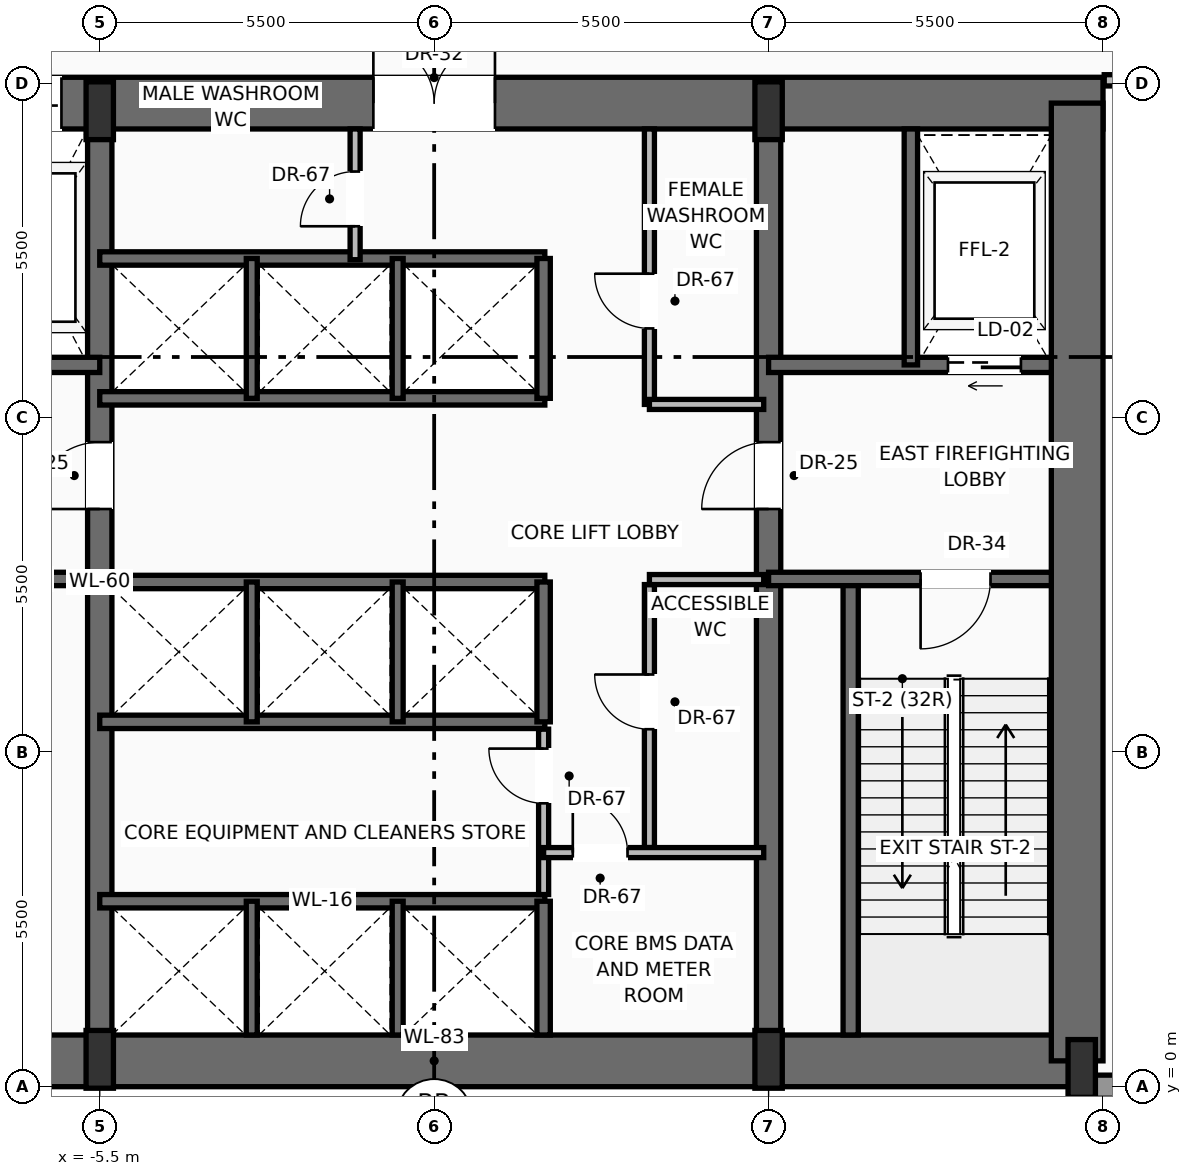
"""IFC4 building model, lengths in metres.
Left out: names, types, materials, properties, quantities, classifications, styles, units other than length and angle.
Written with IfcOpenShell. Run it as: python <this file> out.ifc"""

import sys

from ifc_helpers import new_model, si_unit, direction, frame, frame_2d, origin, origin_2d, place, context, subcontext, project, spatial, rectangle, extrude, source, transform, mapped, element, fill, save


model = new_model("IFC4")
c1 = context("Model", 3, precision=1e-05, world=origin(), true_north=direction((0.0, 1.0)))
c2 = subcontext(c1, "Body", "Model", "MODEL_VIEW")
j1 = project(units=[si_unit("LENGTHUNIT", "METRE"), si_unit("PLANEANGLEUNIT", "RADIAN")], contexts=[c1])
p1 = place(None, origin())
s1 = spatial("IfcSite", under=j1, at=p1, CompositionType="ELEMENT")
p2 = place(p1, origin())
s2 = spatial("IfcBuilding", under=s1, at=p2, CompositionType="ELEMENT")
p3 = place(p2, frame((0.0, 0.0, 5.5)))
s3 = spatial("IfcBuildingStorey", under=s2, at=p3, CompositionType="ELEMENT", Elevation=5.5)
p4 = place(p3, frame((-10.65, 0.425, 0.0), z_axis=(0.0, 0.0, 1.0), x_axis=(1.0, 0.0, 0.0)))
e1 = element("IfcWall", 1, at=p4, inside=s3, PredefinedType="SHEAR", context=c2, shape_type="SweptSolid", body=[
    extrude(rectangle(XDim=21.3, YDim=0.85, at=frame_2d((10.65, 0.0))), origin(), (0.0, 0.0, 1.0), 5.17),
])
p5 = place(p3, frame((-11.0, 16.175, 0.0), z_axis=(0.0, 0.0, 1.0), x_axis=(1.0, 0.0, 0.0)))
e2 = element("IfcWall", 2, at=p5, inside=s3, PredefinedType="SHEAR", context=c2, shape_type="SweptSolid", body=[
    extrude(rectangle(XDim=22.0, YDim=0.85, at=frame_2d((11.0, 0.0))), origin(), (0.0, 0.0, 1.0), 5.17),
])
p6 = place(p5, frame((3.57, 0.0, 0.0)))
e3 = element("IfcOpeningElement", 3, at=p6, cuts=e2, PredefinedType="OPENING", context=c2, shape_type="SweptSolid", body=[
    extrude(rectangle(XDim=1.3, YDim=2.3, at=frame_2d((0.65, 1.15))), frame((0.0, 0.435, 0.0), z_axis=(0.0, -1.0, 0.0), x_axis=(1.0, 0.0, 0.0)), (0.0, 0.0, 1.0), 0.87),
])
p7 = place(p5, frame((10.0, 0.0, 0.0)))
e4 = element("IfcOpeningElement", 4, at=p7, cuts=e2, PredefinedType="OPENING", context=c2, shape_type="SweptSolid", body=[
    extrude(rectangle(XDim=2.0, YDim=2.4, at=frame_2d((1.0, 1.2))), frame((0.0, 0.435, 0.0), z_axis=(0.0, -1.0, 0.0), x_axis=(1.0, 0.0, 0.0)), (0.0, 0.0, 1.0), 0.87),
])
p8 = place(p3, frame((10.575, 0.425, 0.0), z_axis=(0.0, 0.0, 1.0), x_axis=(0.0, 1.0, 0.0)))
e5 = element("IfcWall", 5, at=p8, inside=s3, PredefinedType="SHEAR", context=c2, shape_type="SweptSolid", body=[
    extrude(rectangle(XDim=15.75, YDim=0.85, at=frame_2d((7.875, 0.0))), origin(), (0.0, 0.0, 1.0), 5.17),
])
p9 = place(p3, frame((-5.5, 0.425, 0.0), z_axis=(0.0, 0.0, 1.0), x_axis=(0.0, 1.0, 0.0)))
e6 = element("IfcWall", 6, at=p9, inside=s3, PredefinedType="SHEAR", context=c2, shape_type="SweptSolid", body=[
    extrude(rectangle(XDim=15.75, YDim=0.4, at=frame_2d((7.875, 0.0))), origin(), (0.0, 0.0, 1.0), 5.17),
])
p10 = place(p9, frame((9.075, 0.0, 0.0)))
e7 = element("IfcOpeningElement", 7, at=p10, cuts=e6, PredefinedType="OPENING", context=c2, shape_type="SweptSolid", body=[
    extrude(rectangle(XDim=1.1, YDim=2.2, at=frame_2d((0.55, 1.1))), frame((0.0, 0.21, 0.0), z_axis=(0.0, -1.0, 0.0), x_axis=(1.0, 0.0, 0.0)), (0.0, 0.0, 1.0), 0.42),
])
p11 = place(p3, frame((5.5, 0.425, 0.0), z_axis=(0.0, 0.0, 1.0), x_axis=(0.0, 1.0, 0.0)))
e8 = element("IfcWall", 8, at=p11, inside=s3, PredefinedType="SHEAR", context=c2, shape_type="SweptSolid", body=[
    extrude(rectangle(XDim=15.75, YDim=0.4, at=frame_2d((7.875, 0.0))), origin(), (0.0, 0.0, 1.0), 5.17),
])
p12 = place(p11, frame((9.075, 0.0, 0.0)))
e9 = element("IfcOpeningElement", 9, at=p12, cuts=e8, PredefinedType="OPENING", context=c2, shape_type="SweptSolid", body=[
    extrude(rectangle(XDim=1.1, YDim=2.2, at=frame_2d((0.55, 1.1))), frame((0.0, 0.21, 0.0), z_axis=(0.0, -1.0, 0.0), x_axis=(1.0, 0.0, 0.0)), (0.0, 0.0, 1.0), 0.42),
])
m1 = source(origin(), c2, "Body", "SweptSolid", [
    extrude(rectangle(XDim=0.45, YDim=0.95, at=origin_2d()), origin(), (0.0, 0.0, 1.0), 5.5),
])
for number, where, z_axis, x_axis in (
    (10, (-5.5, 0.45, 0.0), (0.0, 0.0, 1.0), (1.0, 0.0, 0.0)),
    (11, (5.5, 0.45, 0.0), (0.0, 0.0, 1.0), (1.0, 0.0, 0.0)),
    (12, (10.65, 0.3, 0.0), (0.0, 0.0, 1.0), (1.0, 0.0, 0.0)),
    (13, (-5.5, 16.05, 0.0), (0.0, 0.0, 1.0), (1.0, 0.0, 0.0)),
    (14, (5.5, 16.05, 0.0), (0.0, 0.0, 1.0), (1.0, 0.0, 0.0)),
):
    element("IfcColumn", number, at=place(p3, frame(where, z_axis=z_axis, x_axis=x_axis)), inside=s3, PredefinedType="PILASTER", context=c2, shape_type="MappedRepresentation", body=[
        mapped(m1, transform((0.0, 0.0, 0.0), scale=1.0)),
    ])
p13 = place(p3, frame((29.95, 0.0, 0.0), z_axis=(0.0, 0.0, 1.0), x_axis=(-1.0, 0.0, 0.0)))
e15 = element("IfcWall", 15, at=p13, inside=s3, PredefinedType="SOLIDWALL", context=c2, shape_type="SweptSolid", body=[
    extrude(rectangle(XDim=19.4, YDim=0.38, at=frame_2d((9.7, 0.0))), origin(), (0.0, 0.0, 1.0), 4.11),
])
p14 = place(p13, frame((8.8, 0.0, 0.95)))
e16 = element("IfcOpeningElement", 16, at=p14, cuts=e15, PredefinedType="OPENING", context=c2, shape_type="SweptSolid", body=[
    extrude(rectangle(XDim=1.8, YDim=2.4, at=frame_2d((0.9, 1.2))), frame((0.0, 0.2, 0.0), z_axis=(0.0, -1.0, 0.0), x_axis=(1.0, 0.0, 0.0)), (0.0, 0.0, 1.0), 0.4),
])
p15 = place(p3, frame((-5.5, 8.35, 0.0), z_axis=(0.0, 0.0, 1.0), x_axis=(-1.0, 0.0, 0.0)))
e17 = element("IfcWall", 17, at=p15, inside=s3, PredefinedType="SOLIDWALL", context=c2, shape_type="SweptSolid", body=[
    extrude(rectangle(XDim=4.65, YDim=0.22, at=frame_2d((2.325, 0.0))), origin(), (0.0, 0.0, 1.0), 5.17),
])
p16 = place(p15, frame((2.5, 0.0, 0.0)))
e18 = element("IfcOpeningElement", 18, at=p16, cuts=e17, PredefinedType="OPENING", context=c2, shape_type="SweptSolid", body=[
    extrude(rectangle(XDim=1.15, YDim=2.2, at=frame_2d((0.575, 1.1))), frame((0.0, 0.12, 0.0), z_axis=(0.0, -1.0, 0.0), x_axis=(1.0, 0.0, 0.0)), (0.0, 0.0, 1.0), 0.24),
])
p17 = place(p3, frame((-5.5, 11.87, 0.0), z_axis=(0.0, 0.0, 1.0), x_axis=(-1.0, 0.0, 0.0)))
e19 = element("IfcWall", 19, at=p17, inside=s3, PredefinedType="SOLIDWALL", context=c2, shape_type="SweptSolid", body=[
    extrude(rectangle(XDim=4.65, YDim=0.25, at=frame_2d((2.325, 0.0))), origin(), (0.0, 0.0, 1.0), 5.17),
])
p18 = place(p17, frame((2.95, 0.0, 0.0)))
e20 = element("IfcOpeningElement", 20, at=p18, cuts=e19, PredefinedType="OPENING", context=c2, shape_type="SweptSolid", body=[
    extrude(rectangle(XDim=1.2, YDim=2.25, at=frame_2d((0.6, 1.125))), frame((0.0, 0.135, 0.0), z_axis=(0.0, -1.0, 0.0), x_axis=(1.0, 0.0, 0.0)), (0.0, 0.0, 1.0), 0.27),
])
p19 = place(p3, frame((6.85, 0.85, 0.0), z_axis=(0.0, 0.0, 1.0), x_axis=(0.0, 1.0, 0.0)))
e21 = element("IfcWall", 21, at=p19, inside=s3, PredefinedType="SOLIDWALL", context=c2, shape_type="SweptSolid", body=[
    extrude(rectangle(XDim=7.5, YDim=0.25, at=frame_2d((3.75, 0.0))), origin(), (0.0, 0.0, 1.0), 5.17),
])
p20 = place(p3, frame((10.15, 8.35, 0.0), z_axis=(0.0, 0.0, 1.0), x_axis=(-1.0, 0.0, 0.0)))
e22 = element("IfcWall", 22, at=p20, inside=s3, PredefinedType="SOLIDWALL", context=c2, shape_type="SweptSolid", body=[
    extrude(rectangle(XDim=4.65, YDim=0.22, at=frame_2d((2.325, 0.0))), origin(), (0.0, 0.0, 1.0), 5.17),
])
p21 = place(p20, frame((1.0, 0.0, 0.0)))
e23 = element("IfcOpeningElement", 23, at=p21, cuts=e22, PredefinedType="OPENING", context=c2, shape_type="SweptSolid", body=[
    extrude(rectangle(XDim=1.15, YDim=2.2, at=frame_2d((0.575, 1.1))), frame((0.0, 0.12, 0.0), z_axis=(0.0, -1.0, 0.0), x_axis=(1.0, 0.0, 0.0)), (0.0, 0.0, 1.0), 0.24),
])
p22 = place(p3, frame((10.15, 11.87, 0.0), z_axis=(0.0, 0.0, 1.0), x_axis=(-1.0, 0.0, 0.0)))
e24 = element("IfcWall", 24, at=p22, inside=s3, PredefinedType="SOLIDWALL", context=c2, shape_type="SweptSolid", body=[
    extrude(rectangle(XDim=4.65, YDim=0.25, at=frame_2d((2.325, 0.0))), origin(), (0.0, 0.0, 1.0), 5.17),
])
p23 = place(p22, frame((0.5, 0.0, 0.0)))
e25 = element("IfcOpeningElement", 25, at=p23, cuts=e24, PredefinedType="OPENING", context=c2, shape_type="SweptSolid", body=[
    extrude(rectangle(XDim=1.2, YDim=2.25, at=frame_2d((0.6, 1.125))), frame((0.0, 0.135, 0.0), z_axis=(0.0, -1.0, 0.0), x_axis=(1.0, 0.0, 0.0)), (0.0, 0.0, 1.0), 0.27),
])
p24 = place(p3, frame((7.84, 11.87, 0.0), z_axis=(0.0, 0.0, 1.0), x_axis=(0.0, 1.0, 0.0)))
e26 = element("IfcWall", 26, at=p24, inside=s3, PredefinedType="SOLIDWALL", context=c2, shape_type="SweptSolid", body=[
    extrude(rectangle(XDim=3.88, YDim=0.22, at=frame_2d((1.94, 0.0))), origin(), (0.0, 0.0, 1.0), 5.17),
])
p25 = place(p3, frame((-5.5, 3.05, 0.0), z_axis=(0.0, 0.0, 1.0), x_axis=(1.0, 0.0, 0.0)))
e27 = element("IfcWall", 27, at=p25, inside=s3, PredefinedType="SOLIDWALL", context=c2, shape_type="SweptSolid", body=[
    extrude(rectangle(XDim=7.32, YDim=0.22, at=frame_2d((3.66, 0.0))), origin(), (0.0, 0.0, 1.0), 5.17),
])
p26 = place(p3, frame((1.8, 0.85, 0.0), z_axis=(0.0, 0.0, 1.0), x_axis=(0.0, 1.0, 0.0)))
e28 = element("IfcWall", 28, at=p26, inside=s3, PredefinedType="SOLIDWALL", context=c2, shape_type="SweptSolid", body=[
    extrude(rectangle(XDim=2.2, YDim=0.22, at=frame_2d((1.1, 0.0))), origin(), (0.0, 0.0, 1.0), 5.17),
])
for number, where, z_axis, x_axis in (
    (29, (-3.0, 0.85, 0.0), (0.0, 0.0, 1.0), (0.0, 1.0, 0.0)),
    (30, (-0.6, 0.85, 0.0), (0.0, 0.0, 1.0), (0.0, 1.0, 0.0)),
):
    element("IfcWall", number, at=place(p3, frame(where, z_axis=z_axis, x_axis=x_axis)), inside=s3, PredefinedType="SOLIDWALL", context=c2, shape_type="SweptSolid", body=[
        extrude(rectangle(XDim=2.2, YDim=0.18, at=frame_2d((1.1, 0.0))), origin(), (0.0, 0.0, 1.0), 5.17),
    ])
p27 = place(p3, frame((1.8, 3.16, 0.0), z_axis=(0.0, 0.0, 1.0), x_axis=(0.0, 1.0, 0.0)))
e31 = element("IfcWall", 31, at=p27, inside=s3, PredefinedType="PARTITIONING", context=c2, shape_type="SweptSolid", body=[
    extrude(rectangle(XDim=2.72, YDim=0.165, at=frame_2d((1.36, 0.0))), origin(), (0.0, 0.0, 1.0), 5.162),
])
p28 = place(p27, frame((1.5, 0.0, 0.0)))
e32 = element("IfcOpeningElement", 32, at=p28, cuts=e31, PredefinedType="OPENING", context=c2, shape_type="SweptSolid", body=[
    extrude(rectangle(XDim=0.9, YDim=2.1, at=frame_2d((0.45, 1.05))), frame((0.0, 0.093, 0.0), z_axis=(0.0, -1.0, 0.0), x_axis=(1.0, 0.0, 0.0)), (0.0, 0.0, 1.0), 0.185),
])
p29 = place(p3, frame((3.54, 3.933, 0.0), z_axis=(0.0, 0.0, 1.0), x_axis=(0.0, 1.0, 0.0)))
e33 = element("IfcWall", 33, at=p29, inside=s3, PredefinedType="PARTITIONING", context=c2, shape_type="SweptSolid", body=[
    extrude(rectangle(XDim=4.325, YDim=0.165, at=frame_2d((2.163, 0.0))), origin(), (0.0, 0.0, 1.0), 5.162),
])
p30 = place(p29, frame((1.946, 0.0, 0.0)))
e34 = element("IfcOpeningElement", 34, at=p30, cuts=e33, PredefinedType="OPENING", context=c2, shape_type="SweptSolid", body=[
    extrude(rectangle(XDim=0.9, YDim=2.1, at=frame_2d((0.45, 1.05))), frame((0.0, 0.093, 0.0), z_axis=(0.0, -1.0, 0.0), x_axis=(1.0, 0.0, 0.0)), (0.0, 0.0, 1.0), 0.185),
])
p31 = place(p3, frame((3.54, 8.34, 0.0), z_axis=(0.0, 0.0, 1.0), x_axis=(1.0, 0.0, 0.0)))
e35 = element("IfcWall", 35, at=p31, inside=s3, PredefinedType="PARTITIONING", context=c2, shape_type="SweptSolid", body=[
    extrude(rectangle(XDim=1.88, YDim=0.165, at=frame_2d((0.94, 0.0))), origin(), (0.0, 0.0, 1.0), 5.162),
])
p32 = place(p3, frame((1.8, 3.85, 0.0), z_axis=(0.0, 0.0, 1.0), x_axis=(1.0, 0.0, 0.0)))
e36 = element("IfcWall", 36, at=p32, inside=s3, PredefinedType="PARTITIONING", context=c2, shape_type="SweptSolid", body=[
    extrude(rectangle(XDim=3.62, YDim=0.165, at=frame_2d((1.81, 0.0))), origin(), (0.0, 0.0, 1.0), 5.162),
])
p33 = place(p32, frame((0.48, 0.0, 0.0)))
e37 = element("IfcOpeningElement", 37, at=p33, cuts=e36, PredefinedType="OPENING", context=c2, shape_type="SweptSolid", body=[
    extrude(rectangle(XDim=0.9, YDim=2.1, at=frame_2d((0.45, 1.05))), frame((0.0, 0.093, 0.0), z_axis=(0.0, -1.0, 0.0), x_axis=(1.0, 0.0, 0.0)), (0.0, 0.0, 1.0), 0.185),
])
for number, where, z_axis, x_axis in (
    (38, (-5.5, 6.0, 0.0), (0.0, 0.0, 1.0), (1.0, 0.0, 0.0)),
    (39, (-5.5, 8.3, 0.0), (0.0, 0.0, 1.0), (1.0, 0.0, 0.0)),
):
    element("IfcWall", number, at=place(p3, frame(where, z_axis=z_axis, x_axis=x_axis)), inside=s3, PredefinedType="SOLIDWALL", context=c2, shape_type="SweptSolid", body=[
        extrude(rectangle(XDim=7.32, YDim=0.22, at=frame_2d((3.66, 0.0))), origin(), (0.0, 0.0, 1.0), 5.17),
    ])
p34 = place(p3, frame((1.8, 6.0, 0.0), z_axis=(0.0, 0.0, 1.0), x_axis=(0.0, 1.0, 0.0)))
e40 = element("IfcWall", 40, at=p34, inside=s3, PredefinedType="SOLIDWALL", context=c2, shape_type="SweptSolid", body=[
    extrude(rectangle(XDim=2.3, YDim=0.22, at=frame_2d((1.15, 0.0))), origin(), (0.0, 0.0, 1.0), 5.17),
])
for number, where, z_axis, x_axis in (
    (41, (-3.0, 6.0, 0.0), (0.0, 0.0, 1.0), (0.0, 1.0, 0.0)),
    (42, (-0.6, 6.0, 0.0), (0.0, 0.0, 1.0), (0.0, 1.0, 0.0)),
):
    element("IfcWall", number, at=place(p3, frame(where, z_axis=z_axis, x_axis=x_axis)), inside=s3, PredefinedType="SOLIDWALL", context=c2, shape_type="SweptSolid", body=[
        extrude(rectangle(XDim=2.3, YDim=0.18, at=frame_2d((1.15, 0.0))), origin(), (0.0, 0.0, 1.0), 5.17),
    ])
for number, where, z_axis, x_axis in (
    (43, (-5.5, 11.32, 0.0), (0.0, 0.0, 1.0), (1.0, 0.0, 0.0)),
    (44, (-5.5, 13.62, 0.0), (0.0, 0.0, 1.0), (1.0, 0.0, 0.0)),
):
    element("IfcWall", number, at=place(p3, frame(where, z_axis=z_axis, x_axis=x_axis)), inside=s3, PredefinedType="SOLIDWALL", context=c2, shape_type="SweptSolid", body=[
        extrude(rectangle(XDim=7.32, YDim=0.22, at=frame_2d((3.66, 0.0))), origin(), (0.0, 0.0, 1.0), 5.17),
    ])
p35 = place(p3, frame((1.8, 11.32, 0.0), z_axis=(0.0, 0.0, 1.0), x_axis=(0.0, 1.0, 0.0)))
e45 = element("IfcWall", 45, at=p35, inside=s3, PredefinedType="SOLIDWALL", context=c2, shape_type="SweptSolid", body=[
    extrude(rectangle(XDim=2.3, YDim=0.22, at=frame_2d((1.15, 0.0))), origin(), (0.0, 0.0, 1.0), 5.17),
])
for number, where, z_axis, x_axis in (
    (46, (-3.0, 11.32, 0.0), (0.0, 0.0, 1.0), (0.0, 1.0, 0.0)),
    (47, (-0.6, 11.32, 0.0), (0.0, 0.0, 1.0), (0.0, 1.0, 0.0)),
):
    element("IfcWall", number, at=place(p3, frame(where, z_axis=z_axis, x_axis=x_axis)), inside=s3, PredefinedType="SOLIDWALL", context=c2, shape_type="SweptSolid", body=[
        extrude(rectangle(XDim=2.3, YDim=0.18, at=frame_2d((1.15, 0.0))), origin(), (0.0, 0.0, 1.0), 5.17),
    ])
p36 = place(p3, frame((-1.3, 13.6, 0.0), z_axis=(0.0, 0.0, 1.0), x_axis=(0.0, 1.0, 0.0)))
e48 = element("IfcWall", 48, at=p36, inside=s3, PredefinedType="PARTITIONING", context=c2, shape_type="SweptSolid", body=[
    extrude(rectangle(XDim=2.15, YDim=0.165, at=frame_2d((1.075, 0.0))), origin(), (0.0, 0.0, 1.0), 5.162),
])
p37 = place(p36, frame((0.55, 0.0, 0.0)))
e49 = element("IfcOpeningElement", 49, at=p37, cuts=e48, PredefinedType="OPENING", context=c2, shape_type="SweptSolid", body=[
    extrude(rectangle(XDim=0.9, YDim=2.1, at=frame_2d((0.45, 1.05))), frame((0.0, 0.093, 0.0), z_axis=(0.0, -1.0, 0.0), x_axis=(1.0, 0.0, 0.0)), (0.0, 0.0, 1.0), 0.185),
])
p38 = place(p3, frame((3.54, 11.22, 0.0), z_axis=(0.0, 0.0, 1.0), x_axis=(0.0, 1.0, 0.0)))
e50 = element("IfcWall", 50, at=p38, inside=s3, PredefinedType="PARTITIONING", context=c2, shape_type="SweptSolid", body=[
    extrude(rectangle(XDim=4.53, YDim=0.165, at=frame_2d((2.265, 0.0))), origin(), (0.0, 0.0, 1.0), 5.162),
])
p39 = place(p38, frame((1.25, 0.0, 0.0)))
e51 = element("IfcOpeningElement", 51, at=p39, cuts=e50, PredefinedType="OPENING", context=c2, shape_type="SweptSolid", body=[
    extrude(rectangle(XDim=0.9, YDim=2.1, at=frame_2d((0.45, 1.05))), frame((0.0, 0.093, 0.0), z_axis=(0.0, -1.0, 0.0), x_axis=(1.0, 0.0, 0.0)), (0.0, 0.0, 1.0), 0.185),
])
p40 = place(p3, frame((3.54, 11.22, 0.0), z_axis=(0.0, 0.0, 1.0), x_axis=(1.0, 0.0, 0.0)))
e52 = element("IfcWall", 52, at=p40, inside=s3, PredefinedType="PARTITIONING", context=c2, shape_type="SweptSolid", body=[
    extrude(rectangle(XDim=1.88, YDim=0.165, at=frame_2d((0.94, 0.0))), origin(), (0.0, 0.0, 1.0), 5.162),
])
p41 = place(p3, frame((11.02, 16.55, 0.0), z_axis=(0.0, 0.0, 1.0), x_axis=(1.0, 0.0, 0.0)))
e53 = element("IfcWall", 53, at=p41, inside=s3, PredefinedType="PARTITIONING", context=c2, shape_type="SweptSolid", body=[
    extrude(rectangle(XDim=11.48, YDim=0.185, at=frame_2d((5.74, 0.0))), origin(), (0.0, 0.0, 1.0), 4.122),
])
p42 = place(p41, frame((5.265, 0.0, 0.0)))
e54 = element("IfcOpeningElement", 54, at=p42, cuts=e53, PredefinedType="OPENING", context=c2, shape_type="SweptSolid", body=[
    extrude(rectangle(XDim=0.95, YDim=2.2, at=frame_2d((0.475, 1.1))), frame((0.0, 0.103, 0.0), z_axis=(0.0, -1.0, 0.0), x_axis=(1.0, 0.0, 0.0)), (0.0, 0.0, 1.0), 0.205),
])
m2 = source(origin(), c2, "Body", "SweptSolid", [
    extrude(rectangle(XDim=1.1, YDim=2.2, at=frame_2d((0.55, 1.1))), frame((0.0, 0.025, 0.0), z_axis=(0.0, -1.0, 0.0), x_axis=(1.0, 0.0, 0.0)), (0.0, 0.0, 1.0), 0.05),
])
p43 = place(p10, origin())
e55 = element("IfcDoor", 55, at=p43, inside=s3, OperationType="SINGLE_SWING_LEFT", PredefinedType="DOOR", context=c2, shape_type="MappedRepresentation", body=[
    mapped(m2, transform((0.0, 0.0, 0.0), scale=1.0)),
])
fill(e7, e55)
m3 = source(origin(), c2, "Body", "SweptSolid", [
    extrude(rectangle(XDim=1.3, YDim=2.3, at=frame_2d((0.65, 1.15))), frame((0.0, 0.025, 0.0), z_axis=(0.0, -1.0, 0.0), x_axis=(1.0, 0.0, 0.0)), (0.0, 0.0, 1.0), 0.05),
])
p44 = place(p6, origin())
e56 = element("IfcDoor", 56, at=p44, inside=s3, OperationType="SLIDING_TO_RIGHT", PredefinedType="DOOR", context=c2, shape_type="MappedRepresentation", body=[
    mapped(m3, transform((0.0, 0.0, 0.0), scale=1.0)),
])
fill(e3, e56)
m4 = source(origin(), c2, "Body", "SweptSolid", [
    extrude(rectangle(XDim=1.15, YDim=2.2, at=frame_2d((0.575, 1.1))), frame((0.0, 0.025, 0.0), z_axis=(0.0, -1.0, 0.0), x_axis=(1.0, 0.0, 0.0)), (0.0, 0.0, 1.0), 0.05),
])
p45 = place(p21, origin())
e57 = element("IfcDoor", 57, at=p45, inside=s3, OperationType="SINGLE_SWING_RIGHT", PredefinedType="DOOR", context=c2, shape_type="MappedRepresentation", body=[
    mapped(m4, transform((0.0, 0.0, 0.0), scale=1.0)),
])
fill(e23, e57)
p46 = place(p12, origin())
e58 = element("IfcDoor", 58, at=p46, inside=s3, OperationType="SINGLE_SWING_LEFT", PredefinedType="DOOR", context=c2, shape_type="MappedRepresentation", body=[
    mapped(m2, transform((0.0, 0.0, 0.0), scale=1.0)),
])
fill(e9, e58)
m5 = source(origin(), c2, "Body", "SweptSolid", [
    extrude(rectangle(XDim=1.2, YDim=2.25, at=frame_2d((0.6, 1.125))), frame((0.0, 0.025, 0.0), z_axis=(0.0, -1.0, 0.0), x_axis=(1.0, 0.0, 0.0)), (0.0, 0.0, 1.0), 0.05),
])
p47 = place(p23, origin())
e59 = element("IfcDoor", 59, at=p47, inside=s3, OperationType="SLIDING_TO_RIGHT", PredefinedType="DOOR", context=c2, shape_type="MappedRepresentation", body=[
    mapped(m5, transform((0.0, 0.0, 0.0), scale=1.0)),
])
fill(e25, e59)
m6 = source(origin(), c2, "Body", "SweptSolid", [
    extrude(rectangle(XDim=2.0, YDim=2.4, at=frame_2d((1.0, 1.2))), frame((0.0, 0.025, 0.0), z_axis=(0.0, -1.0, 0.0), x_axis=(1.0, 0.0, 0.0)), (0.0, 0.0, 1.0), 0.05),
])
p48 = place(p7, origin())
e60 = element("IfcDoor", 60, at=p48, inside=s3, OperationType="DOUBLE_DOOR_SINGLE_SWING", PredefinedType="DOOR", context=c2, shape_type="MappedRepresentation", body=[
    mapped(m6, transform((0.0, 0.0, 0.0), scale=1.0)),
])
fill(e4, e60)
m7 = source(origin(), c2, "Body", "SweptSolid", [
    extrude(rectangle(XDim=0.9, YDim=2.1, at=frame_2d((0.45, 1.05))), frame((0.0, 0.025, 0.0), z_axis=(0.0, -1.0, 0.0), x_axis=(1.0, 0.0, 0.0)), (0.0, 0.0, 1.0), 0.05),
])
p49 = place(p28, origin())
e61 = element("IfcDoor", 61, at=p49, inside=s3, OperationType="SINGLE_SWING_RIGHT", PredefinedType="DOOR", context=c2, shape_type="MappedRepresentation", body=[
    mapped(m7, transform((0.0, 0.0, 0.0), scale=1.0)),
])
fill(e32, e61)
p50 = place(p33, origin())
e62 = element("IfcDoor", 62, at=p50, inside=s3, OperationType="SINGLE_SWING_LEFT", PredefinedType="DOOR", context=c2, shape_type="MappedRepresentation", body=[
    mapped(m7, transform((0.0, 0.0, 0.0), scale=1.0)),
])
fill(e37, e62)
p51 = place(p30, origin())
e63 = element("IfcDoor", 63, at=p51, inside=s3, OperationType="SINGLE_SWING_RIGHT", PredefinedType="DOOR", context=c2, shape_type="MappedRepresentation", body=[
    mapped(m7, transform((0.0, 0.0, 0.0), scale=1.0)),
])
fill(e34, e63)
p52 = place(p37, origin())
e64 = element("IfcDoor", 64, at=p52, inside=s3, OperationType="SINGLE_SWING_LEFT", PredefinedType="DOOR", context=c2, shape_type="MappedRepresentation", body=[
    mapped(m7, transform((0.0, 0.0, 0.0), scale=1.0)),
])
fill(e49, e64)
p53 = place(p39, origin())
e65 = element("IfcDoor", 65, at=p53, inside=s3, OperationType="SINGLE_SWING_RIGHT", PredefinedType="DOOR", context=c2, shape_type="MappedRepresentation", body=[
    mapped(m7, transform((0.0, 0.0, 0.0), scale=1.0)),
])
fill(e51, e65)
save(model, sys.argv[1])
